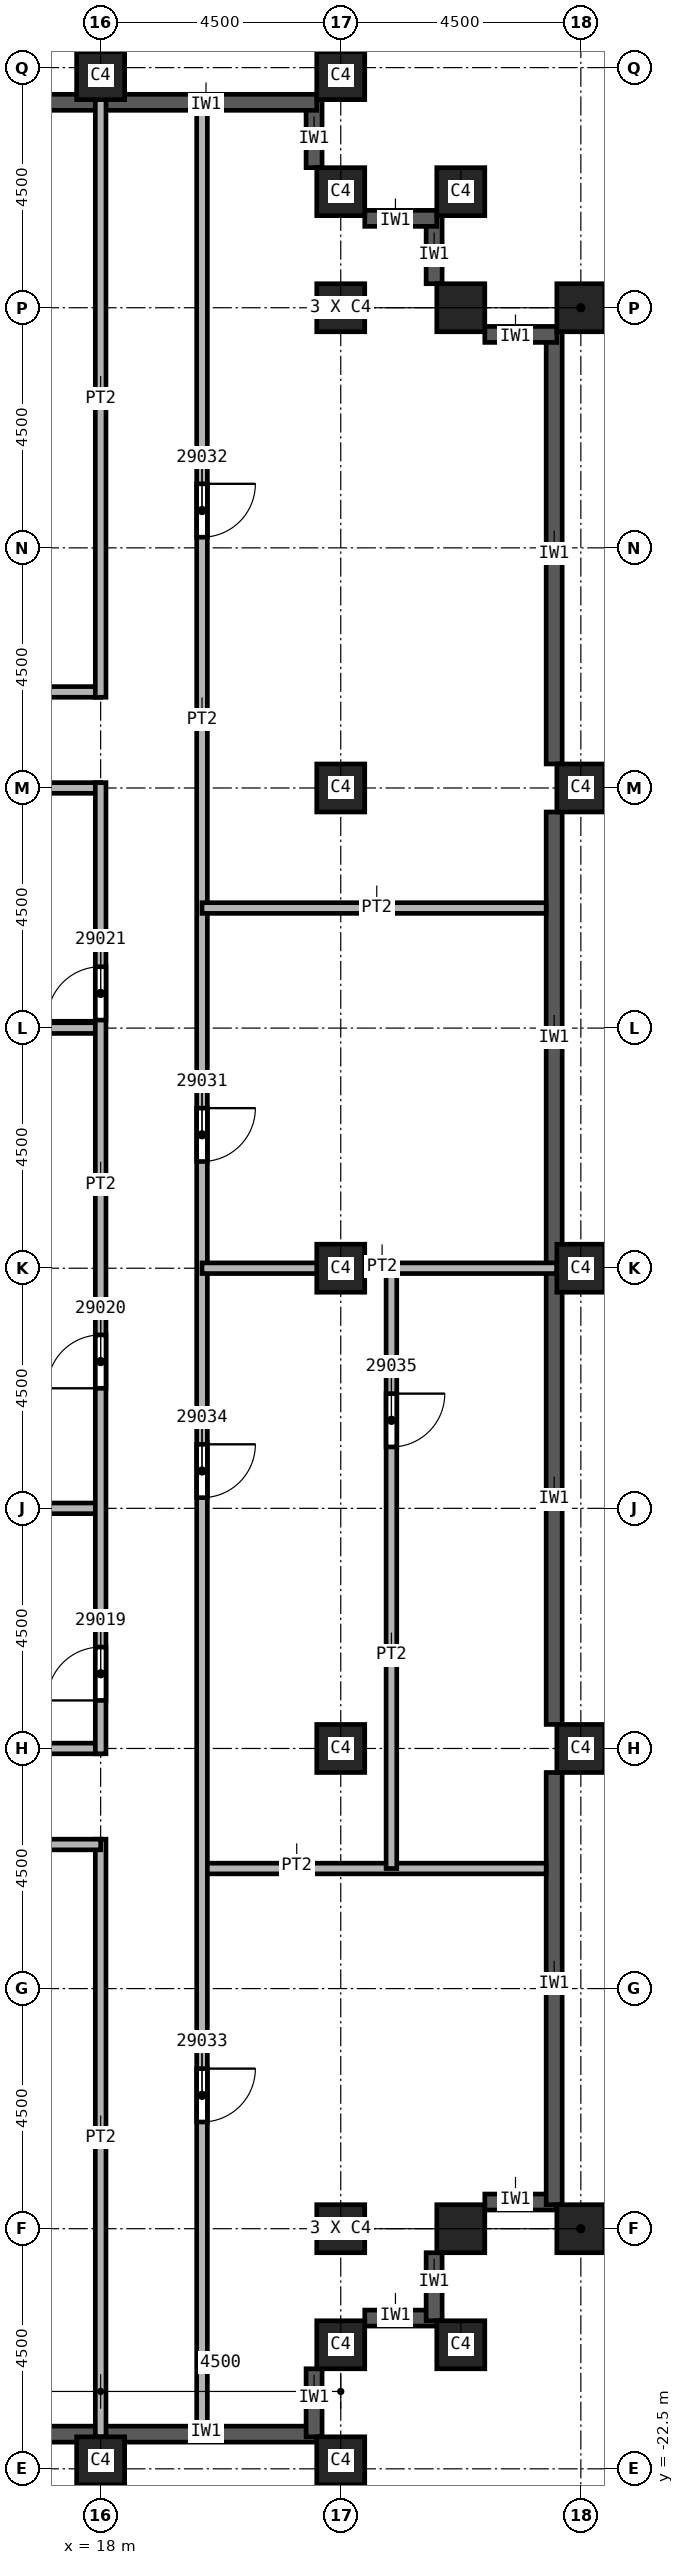
"""IFC4 building model, lengths in metres.
Left out: names, types, materials, properties, quantities, classifications, styles, units other than length and angle.
Written with IfcOpenShell. Run it as: python <this file> out.ifc"""

import sys

from ifc_helpers import new_model, si_unit, direction, frame, frame_2d, origin, origin_2d, place, context, subcontext, project, spatial, rectangle, extrude, element, fill, save


model = new_model("IFC4")
c1 = context("Model", 3, precision=1e-05, world=origin(), true_north=direction((0.0, 1.0)))
c2 = subcontext(c1, "Body", "Model", "MODEL_VIEW")
j1 = project(units=[si_unit("LENGTHUNIT", "METRE"), si_unit("PLANEANGLEUNIT", "RADIAN")], contexts=[c1])
p1 = place(None, origin())
s1 = spatial("IfcSite", under=j1, at=p1, CompositionType="ELEMENT")
p2 = place(p1, origin())
s2 = spatial("IfcBuilding", under=s1, at=p2, CompositionType="ELEMENT")
p3 = place(p2, frame((0.0, 0.0, 294.0)))
s3 = spatial("IfcBuildingStorey", under=s2, at=p3, CompositionType="ELEMENT", Elevation=294.0)
for number, where, z_axis, x_axis in (
    (1, (22.5, 0.0, 0.0), (0.0, 0.0, 1.0), (1.0, 0.0, 0.0)),
    (2, (22.5, 9.0, 0.0), (0.0, 0.0, 1.0), (1.0, 0.0, 0.0)),
    (3, (22.5, 18.0, 0.0), (0.0, 0.0, 1.0), (1.0, 0.0, 0.0)),
    (4, (22.5, -9.0, 0.0), (0.0, 0.0, 1.0), (1.0, 0.0, 0.0)),
    (5, (22.5, -18.0, 0.0), (0.0, 0.0, 1.0), (1.0, 0.0, 0.0)),
    (6, (27.0, 0.0, 0.0), (0.0, 0.0, 1.0), (0.0, 1.0, 0.0)),
    (7, (27.0, 9.0, 0.0), (0.0, 0.0, 1.0), (0.0, 1.0, 0.0)),
    (8, (27.0, 18.0, 0.0), (0.0, 0.0, 1.0), (0.0, 1.0, 0.0)),
    (9, (27.0, -9.0, 0.0), (0.0, 0.0, 1.0), (0.0, 1.0, 0.0)),
    (10, (27.0, -18.0, 0.0), (0.0, 0.0, 1.0), (0.0, 1.0, 0.0)),
):
    element("IfcColumn", number, at=place(p3, frame(where, z_axis=z_axis, x_axis=x_axis)), inside=s3, PredefinedType="COLUMN", context=c2, shape_type="SweptSolid", body=[
        extrude(rectangle(XDim=0.9, YDim=0.9, at=origin_2d()), origin(), (0.0, 0.0, 1.0), 5.74),
    ])
for number, where, z_axis, x_axis in (
    (11, (18.0, 22.35, 0.0), (0.0, 0.18, 0.984), (-1.0, 0.0, 0.0)),
    (12, (22.5, 22.35, 0.0), (0.0, 0.18, 0.984), (-1.0, 0.0, 0.0)),
    (13, (18.0, -22.35, 0.0), (0.0, -0.18, 0.984), (1.0, 0.0, 0.0)),
    (14, (22.5, -22.35, 0.0), (0.0, -0.18, 0.984), (1.0, 0.0, 0.0)),
):
    element("IfcColumn", number, at=place(p3, frame(where, z_axis=z_axis, x_axis=x_axis)), inside=s3, PredefinedType="COLUMN", context=c2, shape_type="SweptSolid", body=[
        extrude(rectangle(XDim=0.9, YDim=0.9, at=origin_2d()), origin(), (0.0, 0.0, 1.0), 5.835),
    ])
for number, where, z_axis, x_axis in (
    (15, (22.5, 20.175, 0.0), (0.0, 0.091, 0.996), (-1.0, 0.0, 0.0)),
    (16, (24.75, 20.175, 0.0), (0.0, 0.091, 0.996), (-1.0, 0.0, 0.0)),
):
    element("IfcColumn", number, at=place(p3, frame(where, z_axis=z_axis, x_axis=x_axis)), inside=s3, PredefinedType="COLUMN", context=c2, shape_type="SweptSolid", body=[
        extrude(rectangle(XDim=0.9, YDim=0.9, at=origin_2d()), origin(), (0.0, 0.0, 1.0), 5.764),
    ])
p4 = place(p3, frame((24.75, 18.0, 0.0), z_axis=(0.0, 0.0, 1.0), x_axis=(1.0, 0.0, 0.0)))
e17 = element("IfcColumn", 17, at=p4, inside=s3, PredefinedType="COLUMN", context=c2, shape_type="SweptSolid", body=[
    extrude(rectangle(XDim=0.9, YDim=0.9, at=origin_2d()), origin(), (0.0, 0.0, 1.0), 5.74),
])
for number, where, z_axis, x_axis in (
    (18, (22.5, -20.175, 0.0), (0.0, -0.091, 0.996), (1.0, 0.0, 0.0)),
    (19, (24.75, -20.175, 0.0), (0.0, -0.091, 0.996), (1.0, 0.0, 0.0)),
):
    element("IfcColumn", number, at=place(p3, frame(where, z_axis=z_axis, x_axis=x_axis)), inside=s3, PredefinedType="COLUMN", context=c2, shape_type="SweptSolid", body=[
        extrude(rectangle(XDim=0.9, YDim=0.9, at=origin_2d()), origin(), (0.0, 0.0, 1.0), 5.764),
    ])
p5 = place(p3, frame((24.75, -18.0, 0.0), z_axis=(0.0, 0.0, 1.0), x_axis=(1.0, 0.0, 0.0)))
e20 = element("IfcColumn", 20, at=p5, inside=s3, PredefinedType="COLUMN", context=c2, shape_type="SweptSolid", body=[
    extrude(rectangle(XDim=0.9, YDim=0.9, at=origin_2d()), origin(), (0.0, 0.0, 1.0), 5.74),
])
for number, where, z_axis, x_axis in (
    (21, (13.95, -21.85, 0.0), (0.0, 0.0, 1.0), (1.0, 0.0, 0.0)),
    (22, (18.05, -21.85, 0.0), (0.0, 0.0, 1.0), (1.0, 0.0, 0.0)),
):
    element("IfcWall", number, at=place(p3, frame(where, z_axis=z_axis, x_axis=x_axis)), inside=s3, PredefinedType="SOLIDWALL", context=c2, shape_type="SweptSolid", body=[
        extrude(rectangle(XDim=4.0, YDim=0.3, at=frame_2d((2.0, 0.0))), origin(), (0.0, 0.0, 1.0), 5.14),
    ])
p6 = place(p3, frame((22.0, -21.9, 0.0), z_axis=(0.0, 0.0, 1.0), x_axis=(0.0, 1.0, 0.0)))
e23 = element("IfcWall", 23, at=p6, inside=s3, PredefinedType="SOLIDWALL", context=c2, shape_type="SweptSolid", body=[
    extrude(rectangle(XDim=1.275, YDim=0.3, at=frame_2d((0.637, 0.0))), origin(), (0.0, 0.0, 1.0), 5.14),
])
p7 = place(p3, frame((22.95, -19.675, 0.0), z_axis=(0.0, 0.0, 1.0), x_axis=(1.0, 0.0, 0.0)))
e24 = element("IfcWall", 24, at=p7, inside=s3, PredefinedType="SOLIDWALL", context=c2, shape_type="SweptSolid", body=[
    extrude(rectangle(XDim=1.35, YDim=0.3, at=frame_2d((0.675, 0.0))), origin(), (0.0, 0.0, 1.0), 5.14),
])
p8 = place(p3, frame((24.25, -19.725, 0.0), z_axis=(0.0, 0.0, 1.0), x_axis=(0.0, 1.0, 0.0)))
e25 = element("IfcWall", 25, at=p8, inside=s3, PredefinedType="SOLIDWALL", context=c2, shape_type="SweptSolid", body=[
    extrude(rectangle(XDim=1.275, YDim=0.3, at=frame_2d((0.638, 0.0))), origin(), (0.0, 0.0, 1.0), 5.14),
])
p9 = place(p3, frame((25.2, -17.5, 0.0), z_axis=(0.0, 0.0, 1.0), x_axis=(1.0, 0.0, 0.0)))
e26 = element("IfcWall", 26, at=p9, inside=s3, PredefinedType="SOLIDWALL", context=c2, shape_type="SweptSolid", body=[
    extrude(rectangle(XDim=1.35, YDim=0.3, at=frame_2d((0.675, 0.0))), origin(), (0.0, 0.0, 1.0), 5.14),
])
p10 = place(p3, frame((26.5, -17.55, 0.0), z_axis=(0.0, 0.0, 1.0), x_axis=(0.0, 1.0, 0.0)))
e27 = element("IfcWall", 27, at=p10, inside=s3, PredefinedType="SOLIDWALL", context=c2, shape_type="SweptSolid", body=[
    extrude(rectangle(XDim=8.1, YDim=0.3, at=frame_2d((4.05, 0.0))), origin(), (0.0, 0.0, 1.0), 5.14),
])
for number, where, z_axis, x_axis in (
    (28, (26.5, -8.55, 0.0), (0.0, 0.0, 1.0), (0.0, 1.0, 0.0)),
    (29, (26.5, 0.05, 0.0), (0.0, 0.0, 1.0), (0.0, 1.0, 0.0)),
):
    element("IfcWall", number, at=place(p3, frame(where, z_axis=z_axis, x_axis=x_axis)), inside=s3, PredefinedType="SOLIDWALL", context=c2, shape_type="SweptSolid", body=[
        extrude(rectangle(XDim=8.5, YDim=0.3, at=frame_2d((4.25, 0.0))), origin(), (0.0, 0.0, 1.0), 5.14),
    ])
p11 = place(p3, frame((26.5, 9.45, 0.0), z_axis=(0.0, 0.0, 1.0), x_axis=(0.0, 1.0, 0.0)))
e30 = element("IfcWall", 30, at=p11, inside=s3, PredefinedType="SOLIDWALL", context=c2, shape_type="SweptSolid", body=[
    extrude(rectangle(XDim=8.1, YDim=0.3, at=frame_2d((4.05, 0.0))), origin(), (0.0, 0.0, 1.0), 5.14),
])
p12 = place(p3, frame((26.55, 17.5, 0.0), z_axis=(0.0, 0.0, 1.0), x_axis=(-1.0, 0.0, 0.0)))
e31 = element("IfcWall", 31, at=p12, inside=s3, PredefinedType="SOLIDWALL", context=c2, shape_type="SweptSolid", body=[
    extrude(rectangle(XDim=1.35, YDim=0.3, at=frame_2d((0.675, 0.0))), origin(), (0.0, 0.0, 1.0), 5.14),
])
p13 = place(p3, frame((24.25, 18.45, 0.0), z_axis=(0.0, 0.0, 1.0), x_axis=(0.0, 1.0, 0.0)))
e32 = element("IfcWall", 32, at=p13, inside=s3, PredefinedType="SOLIDWALL", context=c2, shape_type="SweptSolid", body=[
    extrude(rectangle(XDim=1.275, YDim=0.3, at=frame_2d((0.638, 0.0))), origin(), (0.0, 0.0, 1.0), 5.14),
])
p14 = place(p3, frame((24.3, 19.675, 0.0), z_axis=(0.0, 0.0, 1.0), x_axis=(-1.0, 0.0, 0.0)))
e33 = element("IfcWall", 33, at=p14, inside=s3, PredefinedType="SOLIDWALL", context=c2, shape_type="SweptSolid", body=[
    extrude(rectangle(XDim=1.35, YDim=0.3, at=frame_2d((0.675, 0.0))), origin(), (0.0, 0.0, 1.0), 5.14),
])
p15 = place(p3, frame((22.0, 20.625, 0.0), z_axis=(0.0, 0.0, 1.0), x_axis=(0.0, 1.0, 0.0)))
e34 = element("IfcWall", 34, at=p15, inside=s3, PredefinedType="SOLIDWALL", context=c2, shape_type="SweptSolid", body=[
    extrude(rectangle(XDim=1.275, YDim=0.3, at=frame_2d((0.637, 0.0))), origin(), (0.0, 0.0, 1.0), 5.14),
])
for number, where, z_axis, x_axis in (
    (35, (22.05, 21.85, 0.0), (0.0, 0.0, 1.0), (-1.0, 0.0, 0.0)),
    (36, (17.95, 21.85, 0.0), (0.0, 0.0, 1.0), (-1.0, 0.0, 0.0)),
):
    element("IfcWall", number, at=place(p3, frame(where, z_axis=z_axis, x_axis=x_axis)), inside=s3, PredefinedType="SOLIDWALL", context=c2, shape_type="SweptSolid", body=[
        extrude(rectangle(XDim=4.0, YDim=0.3, at=frame_2d((2.0, 0.0))), origin(), (0.0, 0.0, 1.0), 5.14),
    ])
for number, where, z_axis, x_axis in (
    (37, (13.5, -9.0, 0.0), (0.0, 0.0, 1.0), (1.0, 0.0, 0.0)),
    (38, (13.5, -4.5, 0.0), (0.0, 0.0, 1.0), (1.0, 0.0, 0.0)),
    (39, (13.5, 4.5, 0.0), (0.0, 0.0, 1.0), (1.0, 0.0, 0.0)),
    (40, (18.0, 9.0, 0.0), (0.0, 0.0, 1.0), (-1.0, 0.0, 0.0)),
):
    element("IfcWall", number, at=place(p3, frame(where, z_axis=z_axis, x_axis=x_axis)), inside=s3, PredefinedType="PARTITIONING", context=c2, shape_type="SweptSolid", body=[
        extrude(rectangle(XDim=4.5, YDim=0.2, at=frame_2d((2.25, 0.0))), origin(), (0.0, 0.0, 1.0), 5.74),
    ])
p16 = place(p3, frame((14.4, 10.8, 0.0), z_axis=(0.0, 0.0, 1.0), x_axis=(1.0, 0.0, 0.0)))
e41 = element("IfcWall", 41, at=p16, inside=s3, PredefinedType="PARTITIONING", context=c2, shape_type="SweptSolid", body=[
    extrude(rectangle(XDim=3.6, YDim=0.2, at=frame_2d((1.8, 0.0))), origin(), (0.0, 0.0, 1.0), 5.74),
])
p17 = place(p3, frame((18.0, -21.9, 0.0), z_axis=(0.0, 0.0, 1.0), x_axis=(0.0, 1.0, 0.0)))
e42 = element("IfcWall", 42, at=p17, inside=s3, PredefinedType="PARTITIONING", context=c2, shape_type="SweptSolid", body=[
    extrude(rectangle(XDim=11.2, YDim=0.2, at=frame_2d((5.6, 0.0))), origin(), (0.0, 0.0, 1.0), 5.74),
])
p18 = place(p3, frame((18.0, -10.8, 0.0), z_axis=(0.0, 0.0, 1.0), x_axis=(-1.0, 0.0, 0.0)))
e43 = element("IfcWall", 43, at=p18, inside=s3, PredefinedType="PARTITIONING", context=c2, shape_type="SweptSolid", body=[
    extrude(rectangle(XDim=3.6, YDim=0.2, at=frame_2d((1.8, 0.0))), origin(), (0.0, 0.0, 1.0), 5.74),
])
p19 = place(p3, frame((18.0, -9.1, 0.0), z_axis=(0.0, 0.0, 1.0), x_axis=(0.0, 1.0, 0.0)))
e44 = element("IfcWall", 44, at=p19, inside=s3, PredefinedType="PARTITIONING", context=c2, shape_type="SweptSolid", body=[
    extrude(rectangle(XDim=18.2, YDim=0.2, at=frame_2d((9.1, 0.0))), origin(), (0.0, 0.0, 1.0), 5.74),
])
p20 = place(p19, frame((1.0, 0.0, 0.0)))
e45 = element("IfcOpeningElement", 45, at=p20, cuts=e44, PredefinedType="OPENING", context=c2, shape_type="SweptSolid", body=[
    extrude(rectangle(XDim=1.0, YDim=2.1, at=frame_2d((0.5, 1.05))), frame((0.0, 0.1, 0.0), z_axis=(0.0, -1.0, 0.0), x_axis=(1.0, 0.0, 0.0)), (0.0, 0.0, 1.0), 0.2),
])
p21 = place(p19, frame((6.85, 0.0, 0.0)))
e46 = element("IfcOpeningElement", 46, at=p21, cuts=e44, PredefinedType="OPENING", context=c2, shape_type="SweptSolid", body=[
    extrude(rectangle(XDim=1.0, YDim=2.1, at=frame_2d((0.5, 1.05))), frame((0.0, 0.1, 0.0), z_axis=(0.0, -1.0, 0.0), x_axis=(1.0, 0.0, 0.0)), (0.0, 0.0, 1.0), 0.2),
])
p22 = place(p19, frame((13.75, 0.0, 0.0)))
e47 = element("IfcOpeningElement", 47, at=p22, cuts=e44, PredefinedType="OPENING", context=c2, shape_type="SweptSolid", body=[
    extrude(rectangle(XDim=1.0, YDim=2.1, at=frame_2d((0.5, 1.05))), frame((0.0, 0.1, 0.0), z_axis=(0.0, -1.0, 0.0), x_axis=(1.0, 0.0, 0.0)), (0.0, 0.0, 1.0), 0.2),
])
p23 = place(p3, frame((18.0, 10.7, 0.0), z_axis=(0.0, 0.0, 1.0), x_axis=(0.0, 1.0, 0.0)))
e48 = element("IfcWall", 48, at=p23, inside=s3, PredefinedType="PARTITIONING", context=c2, shape_type="SweptSolid", body=[
    extrude(rectangle(XDim=11.2, YDim=0.2, at=frame_2d((5.6, 0.0))), origin(), (0.0, 0.0, 1.0), 5.74),
])
p24 = place(p3, frame((19.9, -11.25, 0.0), z_axis=(0.0, 0.0, 1.0), x_axis=(1.0, 0.0, 0.0)))
e49 = element("IfcWall", 49, at=p24, inside=s3, PredefinedType="PARTITIONING", context=c2, shape_type="SweptSolid", body=[
    extrude(rectangle(XDim=6.45, YDim=0.2, at=frame_2d((3.225, 0.0))), origin(), (0.0, 0.0, 1.0), 5.74),
])
p25 = place(p3, frame((19.9, 21.7, 0.0), z_axis=(0.0, 0.0, 1.0), x_axis=(0.0, -1.0, 0.0)))
e50 = element("IfcWall", 50, at=p25, inside=s3, PredefinedType="PARTITIONING", context=c2, shape_type="SweptSolid", body=[
    extrude(rectangle(XDim=43.4, YDim=0.2, at=frame_2d((21.7, 0.0))), origin(), (0.0, 0.0, 1.0), 5.74),
])
p26 = place(p25, frame((18.7, 0.0, 0.0)))
e51 = element("IfcOpeningElement", 51, at=p26, cuts=e50, PredefinedType="OPENING", context=c2, shape_type="SweptSolid", body=[
    extrude(rectangle(XDim=1.0, YDim=2.1, at=frame_2d((0.5, 1.05))), frame((0.0, 0.1, 0.0), z_axis=(0.0, -1.0, 0.0), x_axis=(1.0, 0.0, 0.0)), (0.0, 0.0, 1.0), 0.2),
])
p27 = place(p25, frame((7.0, 0.0, 0.0)))
e52 = element("IfcOpeningElement", 52, at=p27, cuts=e50, PredefinedType="OPENING", context=c2, shape_type="SweptSolid", body=[
    extrude(rectangle(XDim=1.0, YDim=2.1, at=frame_2d((0.5, 1.05))), frame((0.0, 0.1, 0.0), z_axis=(0.0, -1.0, 0.0), x_axis=(1.0, 0.0, 0.0)), (0.0, 0.0, 1.0), 0.2),
])
p28 = place(p25, frame((36.7, 0.0, 0.0)))
e53 = element("IfcOpeningElement", 53, at=p28, cuts=e50, PredefinedType="OPENING", context=c2, shape_type="SweptSolid", body=[
    extrude(rectangle(XDim=1.0, YDim=2.1, at=frame_2d((0.5, 1.05))), frame((0.0, 0.1, 0.0), z_axis=(0.0, -1.0, 0.0), x_axis=(1.0, 0.0, 0.0)), (0.0, 0.0, 1.0), 0.2),
])
p29 = place(p25, frame((25.0, 0.0, 0.0)))
e54 = element("IfcOpeningElement", 54, at=p29, cuts=e50, PredefinedType="OPENING", context=c2, shape_type="SweptSolid", body=[
    extrude(rectangle(XDim=1.0, YDim=2.1, at=frame_2d((0.5, 1.05))), frame((0.0, 0.1, 0.0), z_axis=(0.0, -1.0, 0.0), x_axis=(1.0, 0.0, 0.0)), (0.0, 0.0, 1.0), 0.2),
])
p30 = place(p3, frame((19.9, 6.75, 0.0), z_axis=(0.0, 0.0, 1.0), x_axis=(1.0, 0.0, 0.0)))
e55 = element("IfcWall", 55, at=p30, inside=s3, PredefinedType="PARTITIONING", context=c2, shape_type="SweptSolid", body=[
    extrude(rectangle(XDim=6.45, YDim=0.2, at=frame_2d((3.225, 0.0))), origin(), (0.0, 0.0, 1.0), 5.74),
])
p31 = place(p3, frame((23.45, 0.0, 0.0), z_axis=(0.0, 0.0, 1.0), x_axis=(0.0, -1.0, 0.0)))
e56 = element("IfcWall", 56, at=p31, inside=s3, PredefinedType="PARTITIONING", context=c2, shape_type="SweptSolid", body=[
    extrude(rectangle(XDim=11.25, YDim=0.2, at=frame_2d((5.625, 0.0))), origin(), (0.0, 0.0, 1.0), 5.74),
])
p32 = place(p31, frame((2.35, 0.0, 0.0)))
e57 = element("IfcOpeningElement", 57, at=p32, cuts=e56, PredefinedType="OPENING", context=c2, shape_type="SweptSolid", body=[
    extrude(rectangle(XDim=1.0, YDim=2.1, at=frame_2d((0.5, 1.05))), frame((0.0, 0.1, 0.0), z_axis=(0.0, -1.0, 0.0), x_axis=(1.0, 0.0, 0.0)), (0.0, 0.0, 1.0), 0.2),
])
p33 = place(p3, frame((26.55, 0.0, 0.0), z_axis=(0.0, 0.0, 1.0), x_axis=(-1.0, 0.0, 0.0)))
e58 = element("IfcWall", 58, at=p33, inside=s3, PredefinedType="PARTITIONING", context=c2, shape_type="SweptSolid", body=[
    extrude(rectangle(XDim=6.65, YDim=0.2, at=frame_2d((3.325, 0.0))), origin(), (0.0, 0.0, 1.0), 5.74),
])
p34 = place(p20, origin())
e59 = element("IfcDoor", 59, at=p34, inside=s3, OperationType="SINGLE_SWING_RIGHT", PredefinedType="DOOR", context=c2, shape_type="SweptSolid", body=[
    extrude(rectangle(XDim=1.0, YDim=2.1, at=frame_2d((0.5, 1.05))), frame((0.0, 0.025, 0.0), z_axis=(0.0, -1.0, 0.0), x_axis=(1.0, 0.0, 0.0)), (0.0, 0.0, 1.0), 0.05),
])
fill(e45, e59)
p35 = place(p21, origin())
e60 = element("IfcDoor", 60, at=p35, inside=s3, OperationType="SINGLE_SWING_LEFT", PredefinedType="DOOR", context=c2, shape_type="SweptSolid", body=[
    extrude(rectangle(XDim=1.0, YDim=2.1, at=frame_2d((0.5, 1.05))), frame((0.0, 0.025, 0.0), z_axis=(0.0, -1.0, 0.0), x_axis=(1.0, 0.0, 0.0)), (0.0, 0.0, 1.0), 0.05),
])
fill(e46, e60)
p36 = place(p22, origin())
e61 = element("IfcDoor", 61, at=p36, inside=s3, OperationType="SINGLE_SWING_RIGHT", PredefinedType="DOOR", context=c2, shape_type="SweptSolid", body=[
    extrude(rectangle(XDim=1.0, YDim=2.1, at=frame_2d((0.5, 1.05))), frame((0.0, 0.025, 0.0), z_axis=(0.0, -1.0, 0.0), x_axis=(1.0, 0.0, 0.0)), (0.0, 0.0, 1.0), 0.05),
])
fill(e47, e61)
p37 = place(p26, origin())
e62 = element("IfcDoor", 62, at=p37, inside=s3, OperationType="SINGLE_SWING_RIGHT", PredefinedType="DOOR", context=c2, shape_type="SweptSolid", body=[
    extrude(rectangle(XDim=1.0, YDim=2.1, at=frame_2d((0.5, 1.05))), frame((0.0, 0.025, 0.0), z_axis=(0.0, -1.0, 0.0), x_axis=(1.0, 0.0, 0.0)), (0.0, 0.0, 1.0), 0.05),
])
fill(e51, e62)
p38 = place(p27, origin())
e63 = element("IfcDoor", 63, at=p38, inside=s3, OperationType="SINGLE_SWING_LEFT", PredefinedType="DOOR", context=c2, shape_type="SweptSolid", body=[
    extrude(rectangle(XDim=1.0, YDim=2.1, at=frame_2d((0.5, 1.05))), frame((0.0, 0.025, 0.0), z_axis=(0.0, -1.0, 0.0), x_axis=(1.0, 0.0, 0.0)), (0.0, 0.0, 1.0), 0.05),
])
fill(e52, e63)
p39 = place(p28, origin())
e64 = element("IfcDoor", 64, at=p39, inside=s3, OperationType="SINGLE_SWING_RIGHT", PredefinedType="DOOR", context=c2, shape_type="SweptSolid", body=[
    extrude(rectangle(XDim=1.0, YDim=2.1, at=frame_2d((0.5, 1.05))), frame((0.0, 0.025, 0.0), z_axis=(0.0, -1.0, 0.0), x_axis=(1.0, 0.0, 0.0)), (0.0, 0.0, 1.0), 0.05),
])
fill(e53, e64)
p40 = place(p29, origin())
e65 = element("IfcDoor", 65, at=p40, inside=s3, OperationType="SINGLE_SWING_LEFT", PredefinedType="DOOR", context=c2, shape_type="SweptSolid", body=[
    extrude(rectangle(XDim=1.0, YDim=2.1, at=frame_2d((0.5, 1.05))), frame((0.0, 0.025, 0.0), z_axis=(0.0, -1.0, 0.0), x_axis=(1.0, 0.0, 0.0)), (0.0, 0.0, 1.0), 0.05),
])
fill(e54, e65)
p41 = place(p32, origin())
e66 = element("IfcDoor", 66, at=p41, inside=s3, OperationType="SINGLE_SWING_RIGHT", PredefinedType="DOOR", context=c2, shape_type="SweptSolid", body=[
    extrude(rectangle(XDim=1.0, YDim=2.1, at=frame_2d((0.5, 1.05))), frame((0.0, 0.025, 0.0), z_axis=(0.0, -1.0, 0.0), x_axis=(1.0, 0.0, 0.0)), (0.0, 0.0, 1.0), 0.05),
])
fill(e57, e66)
save(model, sys.argv[1])
